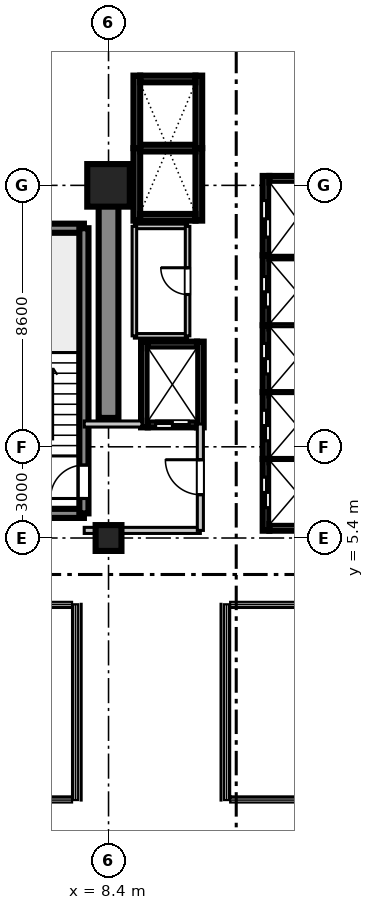
"""IFC4 building model, lengths in metres.
Left out: names, types, materials, properties, quantities, classifications, styles, units other than length and angle.
Written with IfcOpenShell. Run it as: python <this file> out.ifc"""

import sys

from ifc_helpers import new_model, si_unit, direction, frame, frame_2d, origin, origin_2d, place, context, subcontext, project, spatial, rectangle, extrude, source, transform, mapped, element, fill, save


model = new_model("IFC4")
c1 = context("Model", 3, precision=1e-05, world=origin(), true_north=direction((0.0, 1.0)))
c2 = subcontext(c1, "Body", "Model", "MODEL_VIEW")
j1 = project(units=[si_unit("LENGTHUNIT", "METRE"), si_unit("PLANEANGLEUNIT", "RADIAN")], contexts=[c1])
p1 = place(None, origin())
s1 = spatial("IfcSite", under=j1, at=p1, CompositionType="ELEMENT")
p2 = place(p1, origin())
s2 = spatial("IfcBuilding", under=s1, at=p2, CompositionType="ELEMENT")
p3 = place(p2, frame((0.0, 0.0, 47.0)))
s3 = spatial("IfcBuildingStorey", under=s2, at=p3, CompositionType="ELEMENT", Elevation=47.0)
m1 = source(origin(), c2, "Body", "SweptSolid", [
    extrude(rectangle(XDim=0.85, YDim=0.85, at=origin_2d()), origin(), (0.0, 0.0, 1.0), 3.605),
])
p4 = place(p3, frame((8.4, 5.4, 0.0), z_axis=(0.0, 0.0, 1.0), x_axis=(1.0, 0.0, 0.0)))
e1 = element("IfcColumn", 1, at=p4, inside=s3, PredefinedType="PILASTER", context=c2, shape_type="MappedRepresentation", body=[
    mapped(m1, transform((0.0, 0.0, 0.0), scale=1.0)),
])
m2 = source(origin(), c2, "Body", "SweptSolid", [
    extrude(rectangle(XDim=1.4, YDim=1.4, at=origin_2d()), origin(), (0.0, 0.0, 1.0), 3.605),
])
p5 = place(p3, frame((8.4, 17.0, 0.0), z_axis=(0.0, 0.0, 1.0), x_axis=(1.0, 0.0, 0.0)))
e2 = element("IfcColumn", 2, at=p5, inside=s3, PredefinedType="COLUMN", context=c2, shape_type="MappedRepresentation", body=[
    mapped(m2, transform((0.0, 0.0, 0.0), scale=1.0)),
])
m3 = source(origin(), c2, "Body", "SweptSolid", [
    extrude(rectangle(XDim=7.65, YDim=0.65, at=frame_2d((3.825, 0.0))), origin(), (0.0, 0.0, 1.0), 3.37),
])
p6 = place(p3, frame((8.4, 9.35, 0.0), z_axis=(0.0, 0.0, 1.0), x_axis=(0.0, 1.0, 0.0)))
e3 = element("IfcWall", 3, at=p6, inside=s3, PredefinedType="SHEAR", context=c2, shape_type="MappedRepresentation", body=[
    mapped(m3, transform((0.0, 0.0, 0.0), scale=1.0)),
])
m4 = source(origin(), c2, "Body", "SweptSolid", [
    extrude(rectangle(XDim=3.98, YDim=0.3, at=frame_2d((1.99, 0.0))), origin(), (0.0, 0.0, 1.0), 3.37),
])
for number, where, z_axis, x_axis in (
    (4, (3.61, 6.21, 0.0), (0.0, 0.0, 1.0), (1.0, 0.0, 0.0)),
    (5, (3.61, 15.59, 0.0), (0.0, 0.0, 1.0), (1.0, 0.0, 0.0)),
):
    element("IfcWall", number, at=place(p3, frame(where, z_axis=z_axis, x_axis=x_axis)), inside=s3, PredefinedType="SHEAR", context=c2, shape_type="MappedRepresentation", body=[
        mapped(m4, transform((0.0, 0.0, 0.0), scale=1.0)),
    ])
m5 = source(origin(), c2, "Body", "SweptSolid", [
    extrude(rectangle(XDim=9.38, YDim=0.3, at=frame_2d((4.69, 0.0))), origin(), (0.0, 0.0, 1.0), 3.37),
])
p7 = place(p3, frame((7.59, 6.21, 0.0), z_axis=(0.0, 0.0, 1.0), x_axis=(0.0, 1.0, 0.0)))
e6 = element("IfcWall", 6, at=p7, inside=s3, PredefinedType="SHEAR", context=c2, shape_type="MappedRepresentation", body=[
    mapped(m5, transform((0.0, 0.0, 0.0), scale=1.0)),
])
p8 = place(p7, frame((0.49, 0.0, 0.0)))
e7 = element("IfcOpeningElement", 7, at=p8, cuts=e6, PredefinedType="OPENING", context=c2, shape_type="SweptSolid", body=[
    extrude(rectangle(XDim=1.1, YDim=2.15, at=frame_2d((0.55, 1.075))), frame((0.0, 0.16, 0.0), z_axis=(0.0, -1.0, 0.0), x_axis=(1.0, 0.0, 0.0)), (0.0, 0.0, 1.0), 0.32),
])
m6 = source(origin(), c2, "Body", "SweptSolid", [
    extrude(rectangle(XDim=2.36, YDim=0.22, at=frame_2d((1.18, 0.0))), origin(), (0.0, 0.0, 1.0), 3.37),
])
p9 = place(p3, frame((13.58, 5.64, 0.0), z_axis=(0.0, 0.0, 1.0), x_axis=(0.0, 1.0, 0.0)))
e8 = element("IfcWall", 8, at=p9, inside=s3, PredefinedType="SHEAR", context=c2, shape_type="MappedRepresentation", body=[
    mapped(m6, transform((0.0, 0.0, 0.0), scale=1.0)),
])
p10 = place(p9, frame((0.76, 0.0, 0.0)))
e9 = element("IfcOpeningElement", 9, at=p10, cuts=e8, PredefinedType="OPENING", context=c2, shape_type="SweptSolid", body=[
    extrude(rectangle(XDim=1.0, YDim=2.2, at=frame_2d((0.5, 1.1))), frame((0.0, 0.12, 0.0), z_axis=(0.0, -1.0, 0.0), x_axis=(1.0, 0.0, 0.0)), (0.0, 0.0, 1.0), 0.24),
])
m7 = source(origin(), c2, "Body", "SweptSolid", [
    extrude(rectangle(XDim=1.82, YDim=0.22, at=frame_2d((0.91, 0.0))), origin(), (0.0, 0.0, 1.0), 3.37),
])
p11 = place(p3, frame((13.69, 5.75, 0.0), z_axis=(0.0, 0.0, 1.0), x_axis=(1.0, 0.0, 0.0)))
e10 = element("IfcWall", 10, at=p11, inside=s3, PredefinedType="SHEAR", context=c2, shape_type="MappedRepresentation", body=[
    mapped(m7, transform((0.0, 0.0, 0.0), scale=1.0)),
])
m8 = source(origin(), c2, "Body", "SweptSolid", [
    extrude(rectangle(XDim=1.82, YDim=0.22, at=frame_2d((0.91, 0.0))), origin(), (0.0, 0.0, 1.0), 3.65),
])
p12 = place(p3, frame((13.69, 8.0, 0.0), z_axis=(0.0, 0.0, 1.0), x_axis=(1.0, 0.0, 0.0)))
e11 = element("IfcWall", 11, at=p12, inside=s3, PredefinedType="SHEAR", context=c2, shape_type="MappedRepresentation", body=[
    mapped(m8, transform((0.0, 0.0, 0.0), scale=1.0)),
])
m9 = source(origin(), c2, "Body", "SweptSolid", [
    extrude(rectangle(XDim=2.2, YDim=0.22, at=frame_2d((1.1, 0.0))), origin(), (0.0, 0.0, 1.0), 3.37),
])
p13 = place(p3, frame((13.58, 8.0, 0.0), z_axis=(0.0, 0.0, 1.0), x_axis=(0.0, 1.0, 0.0)))
e12 = element("IfcWall", 12, at=p13, inside=s3, PredefinedType="SHEAR", context=c2, shape_type="MappedRepresentation", body=[
    mapped(m9, transform((0.0, 0.0, 0.0), scale=1.0)),
])
p14 = place(p13, frame((0.6, 0.0, 0.0)))
e13 = element("IfcOpeningElement", 13, at=p14, cuts=e12, PredefinedType="OPENING", context=c2, shape_type="SweptSolid", body=[
    extrude(rectangle(XDim=1.0, YDim=2.2, at=frame_2d((0.5, 1.1))), frame((0.0, 0.12, 0.0), z_axis=(0.0, -1.0, 0.0), x_axis=(1.0, 0.0, 0.0)), (0.0, 0.0, 1.0), 0.24),
])
p15 = place(p3, frame((13.69, 10.2, 0.0), z_axis=(0.0, 0.0, 1.0), x_axis=(1.0, 0.0, 0.0)))
e14 = element("IfcWall", 14, at=p15, inside=s3, PredefinedType="SHEAR", context=c2, shape_type="MappedRepresentation", body=[
    mapped(m8, transform((0.0, 0.0, 0.0), scale=1.0)),
])
p16 = place(p3, frame((13.58, 10.2, 0.0), z_axis=(0.0, 0.0, 1.0), x_axis=(0.0, 1.0, 0.0)))
e15 = element("IfcWall", 15, at=p16, inside=s3, PredefinedType="SHEAR", context=c2, shape_type="MappedRepresentation", body=[
    mapped(m9, transform((0.0, 0.0, 0.0), scale=1.0)),
])
p17 = place(p16, frame((0.6, 0.0, 0.0)))
e16 = element("IfcOpeningElement", 16, at=p17, cuts=e15, PredefinedType="OPENING", context=c2, shape_type="SweptSolid", body=[
    extrude(rectangle(XDim=1.0, YDim=2.2, at=frame_2d((0.5, 1.1))), frame((0.0, 0.12, 0.0), z_axis=(0.0, -1.0, 0.0), x_axis=(1.0, 0.0, 0.0)), (0.0, 0.0, 1.0), 0.24),
])
p18 = place(p3, frame((13.69, 12.4, 0.0), z_axis=(0.0, 0.0, 1.0), x_axis=(1.0, 0.0, 0.0)))
e17 = element("IfcWall", 17, at=p18, inside=s3, PredefinedType="SHEAR", context=c2, shape_type="MappedRepresentation", body=[
    mapped(m8, transform((0.0, 0.0, 0.0), scale=1.0)),
])
m10 = source(origin(), c2, "Body", "SweptSolid", [
    extrude(rectangle(XDim=2.3, YDim=0.22, at=frame_2d((1.15, 0.0))), origin(), (0.0, 0.0, 1.0), 3.37),
])
p19 = place(p3, frame((13.58, 12.4, 0.0), z_axis=(0.0, 0.0, 1.0), x_axis=(0.0, 1.0, 0.0)))
e18 = element("IfcWall", 18, at=p19, inside=s3, PredefinedType="SHEAR", context=c2, shape_type="MappedRepresentation", body=[
    mapped(m10, transform((0.0, 0.0, 0.0), scale=1.0)),
])
p20 = place(p19, frame((0.6, 0.0, 0.0)))
e19 = element("IfcOpeningElement", 19, at=p20, cuts=e18, PredefinedType="OPENING", context=c2, shape_type="SweptSolid", body=[
    extrude(rectangle(XDim=1.0, YDim=2.2, at=frame_2d((0.5, 1.1))), frame((0.0, 0.12, 0.0), z_axis=(0.0, -1.0, 0.0), x_axis=(1.0, 0.0, 0.0)), (0.0, 0.0, 1.0), 0.24),
])
p21 = place(p3, frame((13.69, 14.7, 0.0), z_axis=(0.0, 0.0, 1.0), x_axis=(1.0, 0.0, 0.0)))
e20 = element("IfcWall", 20, at=p21, inside=s3, PredefinedType="SHEAR", context=c2, shape_type="MappedRepresentation", body=[
    mapped(m8, transform((0.0, 0.0, 0.0), scale=1.0)),
])
m11 = source(origin(), c2, "Body", "SweptSolid", [
    extrude(rectangle(XDim=2.385, YDim=0.22, at=frame_2d((1.192, 0.0))), origin(), (0.0, 0.0, 1.0), 3.37),
])
for number, where, z_axis, x_axis in (
    (21, (9.33, 15.84, 0.0), (0.0, 0.0, 1.0), (0.0, 1.0, 0.0)),
    (22, (11.37, 15.84, 0.0), (0.0, 0.0, 1.0), (0.0, 1.0, 0.0)),
):
    element("IfcWall", number, at=place(p3, frame(where, z_axis=z_axis, x_axis=x_axis)), inside=s3, PredefinedType="SHEAR", context=c2, shape_type="MappedRepresentation", body=[
        mapped(m11, transform((0.0, 0.0, 0.0), scale=1.0)),
    ])
p22 = place(p3, frame((9.44, 15.95, 0.0), z_axis=(0.0, 0.0, 1.0), x_axis=(1.0, 0.0, 0.0)))
e23 = element("IfcWall", 23, at=p22, inside=s3, PredefinedType="SHEAR", context=c2, shape_type="MappedRepresentation", body=[
    mapped(m7, transform((0.0, 0.0, 0.0), scale=1.0)),
])
p23 = place(p3, frame((9.44, 18.225, 0.0), z_axis=(0.0, 0.0, 1.0), x_axis=(1.0, 0.0, 0.0)))
e24 = element("IfcWall", 24, at=p23, inside=s3, PredefinedType="SHEAR", context=c2, shape_type="MappedRepresentation", body=[
    mapped(m8, transform((0.0, 0.0, 0.0), scale=1.0)),
])
for number, where, z_axis, x_axis in (
    (25, (9.33, 18.225, 0.0), (0.0, 0.0, 1.0), (0.0, 1.0, 0.0)),
    (26, (11.37, 18.225, 0.0), (0.0, 0.0, 1.0), (0.0, 1.0, 0.0)),
):
    element("IfcWall", number, at=place(p3, frame(where, z_axis=z_axis, x_axis=x_axis)), inside=s3, PredefinedType="SHEAR", context=c2, shape_type="MappedRepresentation", body=[
        mapped(m11, transform((0.0, 0.0, 0.0), scale=1.0)),
    ])
p24 = place(p3, frame((9.44, 20.5, 0.0), z_axis=(0.0, 0.0, 1.0), x_axis=(1.0, 0.0, 0.0)))
e27 = element("IfcWall", 27, at=p24, inside=s3, PredefinedType="SHEAR", context=c2, shape_type="MappedRepresentation", body=[
    mapped(m7, transform((0.0, 0.0, 0.0), scale=1.0)),
])
m12 = source(origin(), c2, "Body", "SweptSolid", [
    extrude(rectangle(XDim=2.82, YDim=0.22, at=frame_2d((1.41, 0.0))), origin(), (0.0, 0.0, 1.0), 3.37),
])
for number, where, z_axis, x_axis in (
    (28, (9.58, 9.04, 0.0), (0.0, 0.0, 1.0), (0.0, 1.0, 0.0)),
    (29, (11.42, 9.04, 0.0), (0.0, 0.0, 1.0), (0.0, 1.0, 0.0)),
):
    element("IfcWall", number, at=place(p3, frame(where, z_axis=z_axis, x_axis=x_axis)), inside=s3, PredefinedType="SHEAR", context=c2, shape_type="MappedRepresentation", body=[
        mapped(m12, transform((0.0, 0.0, 0.0), scale=1.0)),
    ])
m13 = source(origin(), c2, "Body", "SweptSolid", [
    extrude(rectangle(XDim=1.62, YDim=0.22, at=frame_2d((0.81, 0.0))), origin(), (0.0, 0.0, 1.0), 3.37),
])
p25 = place(p3, frame((9.69, 9.15, 0.0), z_axis=(0.0, 0.0, 1.0), x_axis=(1.0, 0.0, 0.0)))
e30 = element("IfcWall", 30, at=p25, inside=s3, PredefinedType="SHEAR", context=c2, shape_type="MappedRepresentation", body=[
    mapped(m13, transform((0.0, 0.0, 0.0), scale=1.0)),
])
p26 = place(p25, frame((0.26, 0.0, 0.0)))
e31 = element("IfcOpeningElement", 31, at=p26, cuts=e30, PredefinedType="OPENING", context=c2, shape_type="SweptSolid", body=[
    extrude(rectangle(XDim=1.1, YDim=2.2, at=frame_2d((0.55, 1.1))), frame((0.0, 0.12, 0.0), z_axis=(0.0, -1.0, 0.0), x_axis=(1.0, 0.0, 0.0)), (0.0, 0.0, 1.0), 0.24),
])
p27 = place(p3, frame((9.69, 11.75, 0.0), z_axis=(0.0, 0.0, 1.0), x_axis=(1.0, 0.0, 0.0)))
e32 = element("IfcWall", 32, at=p27, inside=s3, PredefinedType="SHEAR", context=c2, shape_type="MappedRepresentation", body=[
    mapped(m13, transform((0.0, 0.0, 0.0), scale=1.0)),
])
m14 = source(origin(), c2, "Body", "SweptSolid", [
    extrude(rectangle(XDim=2.61, YDim=0.22, at=frame_2d((1.305, 0.0))), origin(), (0.0, 0.0, 1.0), 3.37),
])
p28 = place(p3, frame((13.58, 14.7, 0.0), z_axis=(0.0, 0.0, 1.0), x_axis=(0.0, 1.0, 0.0)))
e33 = element("IfcWall", 33, at=p28, inside=s3, PredefinedType="SHEAR", context=c2, shape_type="MappedRepresentation", body=[
    mapped(m14, transform((0.0, 0.0, 0.0), scale=1.0)),
])
p29 = place(p28, frame((0.6, 0.0, 0.0)))
e34 = element("IfcOpeningElement", 34, at=p29, cuts=e33, PredefinedType="OPENING", context=c2, shape_type="SweptSolid", body=[
    extrude(rectangle(XDim=1.2, YDim=2.2, at=frame_2d((0.6, 1.1))), frame((0.0, 0.12, 0.0), z_axis=(0.0, -1.0, 0.0), x_axis=(1.0, 0.0, 0.0)), (0.0, 0.0, 1.0), 0.24),
])
p30 = place(p3, frame((13.69, 17.2, 0.0), z_axis=(0.0, 0.0, 1.0), x_axis=(1.0, 0.0, 0.0)))
e35 = element("IfcWall", 35, at=p30, inside=s3, PredefinedType="SHEAR", context=c2, shape_type="MappedRepresentation", body=[
    mapped(m7, transform((0.0, 0.0, 0.0), scale=1.0)),
])
m15 = source(origin(), c2, "Body", "SweptSolid", [
    extrude(rectangle(XDim=3.82, YDim=0.2, at=frame_2d((1.91, 0.0))), origin(), (0.0, 0.0, 1.0), 2.71),
])
p31 = place(p3, frame((7.6, 5.65, 0.0), z_axis=(0.0, 0.0, 1.0), x_axis=(1.0, 0.0, 0.0)))
e36 = element("IfcWall", 36, at=p31, inside=s3, PredefinedType="PARTITIONING", context=c2, shape_type="MappedRepresentation", body=[
    mapped(m15, transform((0.0, 0.0, 0.0), scale=1.0)),
])
m16 = source(origin(), c2, "Body", "SweptSolid", [
    extrude(rectangle(XDim=1.9, YDim=0.2, at=frame_2d((0.95, 0.0))), origin(), (0.0, 0.0, 1.0), 2.71),
])
p32 = place(p3, frame((7.6, 9.15, 0.0), z_axis=(0.0, 0.0, 1.0), x_axis=(1.0, 0.0, 0.0)))
e37 = element("IfcWall", 37, at=p32, inside=s3, PredefinedType="PARTITIONING", context=c2, shape_type="MappedRepresentation", body=[
    mapped(m16, transform((0.0, 0.0, 0.0), scale=1.0)),
])
m17 = source(origin(), c2, "Body", "SweptSolid", [
    extrude(rectangle(XDim=3.5, YDim=0.2, at=frame_2d((1.75, 0.0))), origin(), (0.0, 0.0, 1.0), 2.71),
])
p33 = place(p3, frame((11.42, 5.65, 0.0), z_axis=(0.0, 0.0, 1.0), x_axis=(0.0, 1.0, 0.0)))
e38 = element("IfcWall", 38, at=p33, inside=s3, PredefinedType="PARTITIONING", context=c2, shape_type="MappedRepresentation", body=[
    mapped(m17, transform((0.0, 0.0, 0.0), scale=1.0)),
])
p34 = place(p33, frame((1.175, 0.0, 0.0)))
e39 = element("IfcOpeningElement", 39, at=p34, cuts=e38, PredefinedType="OPENING", context=c2, shape_type="SweptSolid", body=[
    extrude(rectangle(XDim=1.15, YDim=2.15, at=frame_2d((0.575, 1.075))), frame((0.0, 0.11, 0.0), z_axis=(0.0, -1.0, 0.0), x_axis=(1.0, 0.0, 0.0)), (0.0, 0.0, 1.0), 0.22),
])
m18 = source(origin(), c2, "Body", "SweptSolid", [
    extrude(rectangle(XDim=1.75, YDim=0.15, at=frame_2d((0.875, 0.0))), origin(), (0.0, 0.0, 1.0), 2.71),
])
for number, where, z_axis, x_axis in (
    (40, (9.25, 12.05, 0.0), (0.0, 0.0, 1.0), (1.0, 0.0, 0.0)),
    (41, (9.25, 15.65, 0.0), (0.0, 0.0, 1.0), (1.0, 0.0, 0.0)),
):
    element("IfcWall", number, at=place(p3, frame(where, z_axis=z_axis, x_axis=x_axis)), inside=s3, PredefinedType="PARTITIONING", context=c2, shape_type="MappedRepresentation", body=[
        mapped(m18, transform((0.0, 0.0, 0.0), scale=1.0)),
    ])
m19 = source(origin(), c2, "Body", "SweptSolid", [
    extrude(rectangle(XDim=3.6, YDim=0.15, at=frame_2d((1.8, 0.0))), origin(), (0.0, 0.0, 1.0), 2.71),
])
p35 = place(p3, frame((9.25, 12.05, 0.0), z_axis=(0.0, 0.0, 1.0), x_axis=(0.0, 1.0, 0.0)))
e42 = element("IfcWall", 42, at=p35, inside=s3, PredefinedType="PARTITIONING", context=c2, shape_type="MappedRepresentation", body=[
    mapped(m19, transform((0.0, 0.0, 0.0), scale=1.0)),
])
p36 = place(p3, frame((11.0, 12.05, 0.0), z_axis=(0.0, 0.0, 1.0), x_axis=(0.0, 1.0, 0.0)))
e43 = element("IfcWall", 43, at=p36, inside=s3, PredefinedType="PARTITIONING", context=c2, shape_type="MappedRepresentation", body=[
    mapped(m19, transform((0.0, 0.0, 0.0), scale=1.0)),
])
p37 = place(p36, frame((1.36, 0.0, 0.0)))
e44 = element("IfcOpeningElement", 44, at=p37, cuts=e43, PredefinedType="OPENING", context=c2, shape_type="SweptSolid", body=[
    extrude(rectangle(XDim=0.88, YDim=2.1, at=frame_2d((0.44, 1.05))), frame((0.0, 0.085, 0.0), z_axis=(0.0, -1.0, 0.0), x_axis=(1.0, 0.0, 0.0)), (0.0, 0.0, 1.0), 0.17),
])
m20 = source(origin(), c2, "Body", "SweptSolid", [
    extrude(rectangle(XDim=1.1, YDim=2.15, at=frame_2d((0.55, 1.075))), frame((0.0, 0.025, 0.0), z_axis=(0.0, -1.0, 0.0), x_axis=(1.0, 0.0, 0.0)), (0.0, 0.0, 1.0), 0.05),
])
p38 = place(p8, origin())
e45 = element("IfcDoor", 45, at=p38, inside=s3, OperationType="SINGLE_SWING_LEFT", PredefinedType="DOOR", context=c2, shape_type="MappedRepresentation", body=[
    mapped(m20, transform((0.0, 0.0, 0.0), scale=1.0)),
])
fill(e7, e45)
m21 = source(origin(), c2, "Body", "SweptSolid", [
    extrude(rectangle(XDim=1.0, YDim=2.2, at=frame_2d((0.5, 1.1))), frame((0.0, 0.025, 0.0), z_axis=(0.0, -1.0, 0.0), x_axis=(1.0, 0.0, 0.0)), (0.0, 0.0, 1.0), 0.05),
])
p39 = place(p10, origin())
e46 = element("IfcDoor", 46, at=p39, inside=s3, OperationType="DOUBLE_DOOR_SLIDING", PredefinedType="DOOR", context=c2, shape_type="MappedRepresentation", body=[
    mapped(m21, transform((0.0, 0.0, 0.0), scale=1.0)),
])
fill(e9, e46)
p40 = place(p14, origin())
e47 = element("IfcDoor", 47, at=p40, inside=s3, OperationType="DOUBLE_DOOR_SLIDING", PredefinedType="DOOR", context=c2, shape_type="MappedRepresentation", body=[
    mapped(m21, transform((0.0, 0.0, 0.0), scale=1.0)),
])
fill(e13, e47)
p41 = place(p17, origin())
e48 = element("IfcDoor", 48, at=p41, inside=s3, OperationType="DOUBLE_DOOR_SLIDING", PredefinedType="DOOR", context=c2, shape_type="MappedRepresentation", body=[
    mapped(m21, transform((0.0, 0.0, 0.0), scale=1.0)),
])
fill(e16, e48)
p42 = place(p20, origin())
e49 = element("IfcDoor", 49, at=p42, inside=s3, OperationType="DOUBLE_DOOR_SLIDING", PredefinedType="DOOR", context=c2, shape_type="MappedRepresentation", body=[
    mapped(m21, transform((0.0, 0.0, 0.0), scale=1.0)),
])
fill(e19, e49)
m22 = source(origin(), c2, "Body", "SweptSolid", [
    extrude(rectangle(XDim=1.1, YDim=2.2, at=frame_2d((0.55, 1.1))), frame((0.0, 0.025, 0.0), z_axis=(0.0, -1.0, 0.0), x_axis=(1.0, 0.0, 0.0)), (0.0, 0.0, 1.0), 0.05),
])
p43 = place(p26, frame((1.1, 0.0, 0.0), z_axis=(0.0, 0.0, 1.0), x_axis=(-1.0, 0.0, 0.0)))
e50 = element("IfcDoor", 50, at=p43, inside=s3, OperationType="DOUBLE_DOOR_SLIDING", PredefinedType="DOOR", context=c2, shape_type="MappedRepresentation", body=[
    mapped(m22, transform((0.0, 0.0, 0.0), scale=1.0)),
])
fill(e31, e50)
m23 = source(origin(), c2, "Body", "SweptSolid", [
    extrude(rectangle(XDim=1.2, YDim=2.2, at=frame_2d((0.6, 1.1))), frame((0.0, 0.025, 0.0), z_axis=(0.0, -1.0, 0.0), x_axis=(1.0, 0.0, 0.0)), (0.0, 0.0, 1.0), 0.05),
])
p44 = place(p29, origin())
e51 = element("IfcDoor", 51, at=p44, inside=s3, OperationType="DOUBLE_DOOR_SLIDING", PredefinedType="DOOR", context=c2, shape_type="MappedRepresentation", body=[
    mapped(m23, transform((0.0, 0.0, 0.0), scale=1.0)),
])
fill(e34, e51)
m24 = source(origin(), c2, "Body", "SweptSolid", [
    extrude(rectangle(XDim=1.15, YDim=2.15, at=frame_2d((0.575, 1.075))), frame((0.0, 0.025, 0.0), z_axis=(0.0, -1.0, 0.0), x_axis=(1.0, 0.0, 0.0)), (0.0, 0.0, 1.0), 0.05),
])
p45 = place(p34, frame((1.15, 0.0, 0.0), z_axis=(0.0, 0.0, 1.0), x_axis=(-1.0, 0.0, 0.0)))
e52 = element("IfcDoor", 52, at=p45, inside=s3, OperationType="SINGLE_SWING_RIGHT", PredefinedType="DOOR", context=c2, shape_type="MappedRepresentation", body=[
    mapped(m24, transform((0.0, 0.0, 0.0), scale=1.0)),
])
fill(e39, e52)
m25 = source(origin(), c2, "Body", "SweptSolid", [
    extrude(rectangle(XDim=0.88, YDim=2.1, at=frame_2d((0.44, 1.05))), frame((0.0, 0.025, 0.0), z_axis=(0.0, -1.0, 0.0), x_axis=(1.0, 0.0, 0.0)), (0.0, 0.0, 1.0), 0.05),
])
p46 = place(p37, origin())
e53 = element("IfcDoor", 53, at=p46, inside=s3, OperationType="SINGLE_SWING_RIGHT", PredefinedType="DOOR", context=c2, shape_type="MappedRepresentation", body=[
    mapped(m25, transform((0.0, 0.0, 0.0), scale=1.0)),
])
fill(e44, e53)
save(model, sys.argv[1])
